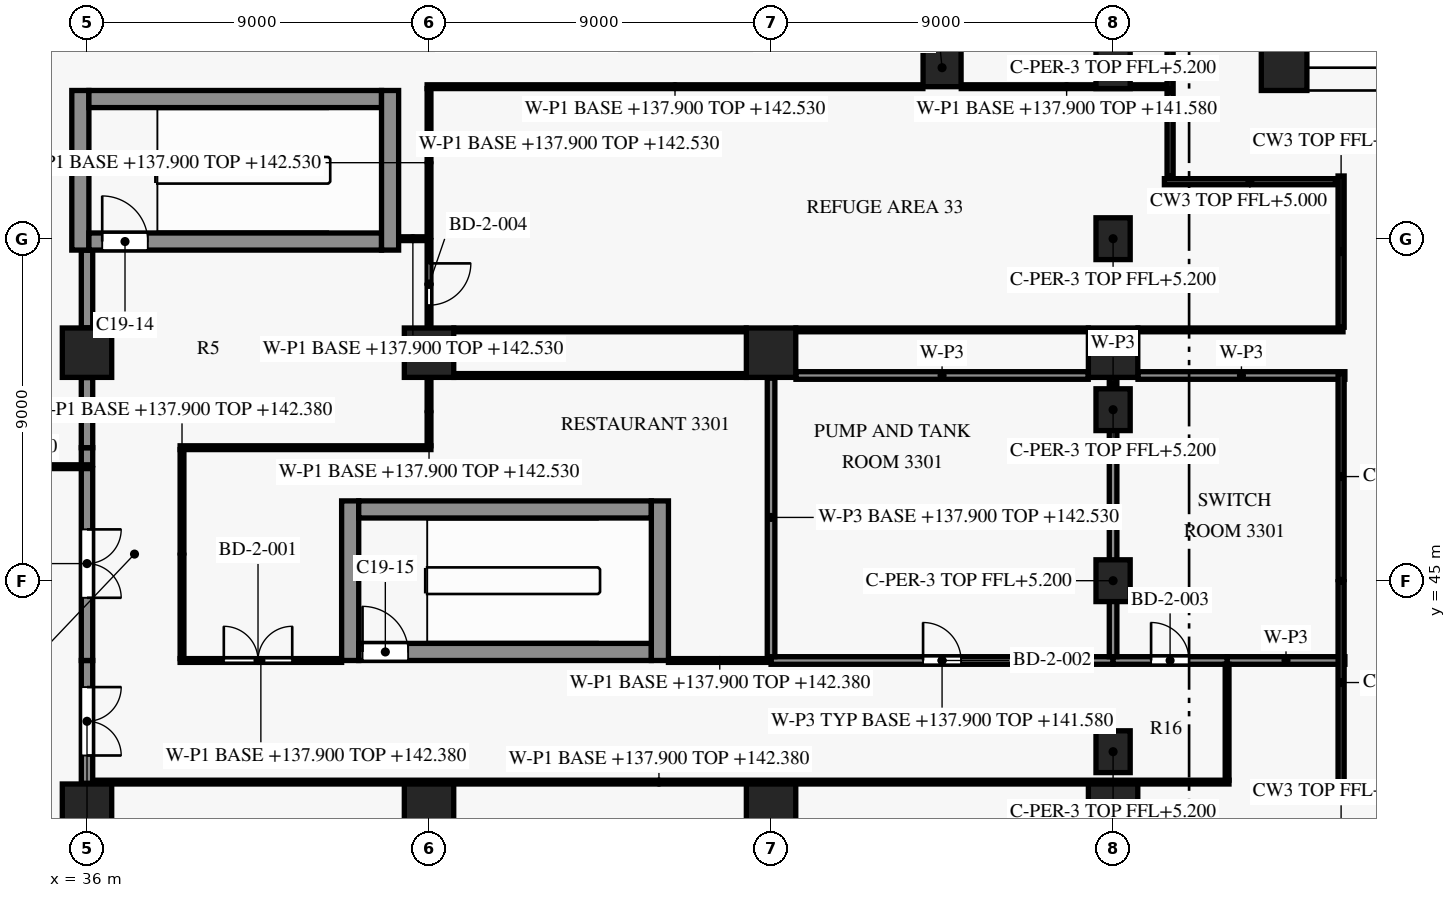
"""IFC4 building model, lengths in metres.
Left out: names, types, materials, properties, quantities, classifications, styles, units other than length and angle.
Written with IfcOpenShell. Run it as: python <this file> out.ifc"""

import sys

from ifc_helpers import new_model, si_unit, direction, frame, frame_2d, origin, origin_2d, place, context, subcontext, project, spatial, rectangle, extrude, element, fill, save


model = new_model("IFC4")
c1 = context("Model", 3, precision=1e-05, world=origin(), true_north=direction((0.0, 1.0)))
c2 = subcontext(c1, "Body", "Model", "MODEL_VIEW")
j1 = project(units=[si_unit("LENGTHUNIT", "METRE"), si_unit("PLANEANGLEUNIT", "RADIAN")], contexts=[c1])
p1 = place(None, origin())
s1 = spatial("IfcSite", under=j1, at=p1, CompositionType="ELEMENT")
p2 = place(p1, origin())
s2 = spatial("IfcBuilding", under=s1, at=p2, CompositionType="ELEMENT")
p3 = place(p2, frame((0.0, 0.0, 137.9)))
s3 = spatial("IfcBuildingStorey", under=s2, at=p3, CompositionType="ELEMENT", Elevation=137.9)
p4 = place(p3, frame((67.5, 58.5, 0.0), z_axis=(0.0, 0.0, 1.0), x_axis=(1.0, 0.0, 0.0)))
e1 = element("IfcColumn", 1, at=p4, inside=s3, PredefinedType="COLUMN", context=c2, shape_type="SweptSolid", body=[
    extrude(rectangle(XDim=1.2, YDim=1.2, at=origin_2d()), origin(), (0.0, 0.0, 1.0), 5.5),
])
for number, where, z_axis, x_axis in (
    (2, (36.0, 39.0, 0.0), (0.0, 0.0, 1.0), (1.0, 0.0, 0.0)),
    (3, (36.0, 51.0, 0.0), (0.0, 0.0, 1.0), (1.0, 0.0, 0.0)),
    (4, (45.0, 39.0, 0.0), (0.0, 0.0, 1.0), (1.0, 0.0, 0.0)),
    (5, (45.0, 51.0, 0.0), (0.0, 0.0, 1.0), (1.0, 0.0, 0.0)),
    (6, (54.0, 39.0, 0.0), (0.0, 0.0, 1.0), (1.0, 0.0, 0.0)),
    (7, (54.0, 51.0, 0.0), (0.0, 0.0, 1.0), (1.0, 0.0, 0.0)),
    (8, (63.0, 39.0, 0.0), (0.0, 0.0, 1.0), (1.0, 0.0, 0.0)),
    (9, (63.0, 51.0, 0.0), (0.0, 0.0, 1.0), (1.0, 0.0, 0.0)),
):
    element("IfcColumn", number, at=place(p3, frame(where, z_axis=z_axis, x_axis=x_axis)), inside=s3, PredefinedType="COLUMN", context=c2, shape_type="SweptSolid", body=[
        extrude(rectangle(XDim=1.3, YDim=1.3, at=origin_2d()), origin(), (0.0, 0.0, 1.0), 5.5),
    ])
p5 = place(p3, frame((43.15, 43.125, 0.0), z_axis=(0.0, 0.0, 1.0), x_axis=(1.0, 0.0, 0.0)))
e10 = element("IfcWall", 10, at=p5, inside=s3, PredefinedType="SHEAR", context=c2, shape_type="SweptSolid", body=[
    extrude(rectangle(XDim=7.7, YDim=0.45, at=frame_2d((3.85, 0.0))), origin(), (0.0, 0.0, 1.0), 5.2),
])
p6 = place(p5, frame((0.1, 0.0, 0.0)))
e11 = element("IfcOpeningElement", 11, at=p6, cuts=e10, PredefinedType="OPENING", context=c2, shape_type="SweptSolid", body=[
    extrude(rectangle(XDim=1.2, YDim=2.2, at=frame_2d((0.6, 1.1))), frame((0.0, 0.235, 0.0), z_axis=(0.0, -1.0, 0.0), x_axis=(1.0, 0.0, 0.0)), (0.0, 0.0, 1.0), 0.47),
])
p7 = place(p3, frame((43.15, 46.875, 0.0), z_axis=(0.0, 0.0, 1.0), x_axis=(1.0, 0.0, 0.0)))
e12 = element("IfcWall", 12, at=p7, inside=s3, PredefinedType="SHEAR", context=c2, shape_type="SweptSolid", body=[
    extrude(rectangle(XDim=7.7, YDim=0.45, at=frame_2d((3.85, 0.0))), origin(), (0.0, 0.0, 1.0), 5.2),
])
p8 = place(p3, frame((36.05, 53.925, 0.0), z_axis=(0.0, 0.0, 1.0), x_axis=(1.0, 0.0, 0.0)))
e13 = element("IfcWall", 13, at=p8, inside=s3, PredefinedType="SHEAR", context=c2, shape_type="SweptSolid", body=[
    extrude(rectangle(XDim=7.7, YDim=0.45, at=frame_2d((3.85, 0.0))), origin(), (0.0, 0.0, 1.0), 5.2),
])
p9 = place(p8, frame((0.35, 0.0, 0.0)))
e14 = element("IfcOpeningElement", 14, at=p9, cuts=e13, PredefinedType="OPENING", context=c2, shape_type="SweptSolid", body=[
    extrude(rectangle(XDim=1.2, YDim=2.2, at=frame_2d((0.6, 1.1))), frame((0.0, 0.235, 0.0), z_axis=(0.0, -1.0, 0.0), x_axis=(1.0, 0.0, 0.0)), (0.0, 0.0, 1.0), 0.47),
])
p10 = place(p3, frame((36.05, 57.675, 0.0), z_axis=(0.0, 0.0, 1.0), x_axis=(1.0, 0.0, 0.0)))
e15 = element("IfcWall", 15, at=p10, inside=s3, PredefinedType="SHEAR", context=c2, shape_type="SweptSolid", body=[
    extrude(rectangle(XDim=7.7, YDim=0.45, at=frame_2d((3.85, 0.0))), origin(), (0.0, 0.0, 1.0), 5.2),
])
p11 = place(p3, frame((35.825, 53.7, 0.0), z_axis=(0.0, 0.0, 1.0), x_axis=(0.0, 1.0, 0.0)))
e16 = element("IfcWall", 16, at=p11, inside=s3, PredefinedType="SHEAR", context=c2, shape_type="SweptSolid", body=[
    extrude(rectangle(XDim=4.2, YDim=0.45, at=frame_2d((2.1, 0.0))), origin(), (0.0, 0.0, 1.0), 5.2),
])
p12 = place(p3, frame((42.925, 42.9, 0.0), z_axis=(0.0, 0.0, 1.0), x_axis=(0.0, 1.0, 0.0)))
e17 = element("IfcWall", 17, at=p12, inside=s3, PredefinedType="SHEAR", context=c2, shape_type="SweptSolid", body=[
    extrude(rectangle(XDim=4.2, YDim=0.45, at=frame_2d((2.1, 0.0))), origin(), (0.0, 0.0, 1.0), 5.2),
])
p13 = place(p3, frame((43.975, 53.7, 0.0), z_axis=(0.0, 0.0, 1.0), x_axis=(0.0, 1.0, 0.0)))
e18 = element("IfcWall", 18, at=p13, inside=s3, PredefinedType="SHEAR", context=c2, shape_type="SweptSolid", body=[
    extrude(rectangle(XDim=4.2, YDim=0.45, at=frame_2d((2.1, 0.0))), origin(), (0.0, 0.0, 1.0), 5.2),
])
p14 = place(p3, frame((51.075, 42.9, 0.0), z_axis=(0.0, 0.0, 1.0), x_axis=(0.0, 1.0, 0.0)))
e19 = element("IfcWall", 19, at=p14, inside=s3, PredefinedType="SHEAR", context=c2, shape_type="SweptSolid", body=[
    extrude(rectangle(XDim=4.2, YDim=0.45, at=frame_2d((2.1, 0.0))), origin(), (0.0, 0.0, 1.0), 5.2),
])
p15 = place(p3, frame((66.05, 39.7, 0.0), z_axis=(0.0, 0.0, 1.0), x_axis=(-1.0, 0.0, 0.0)))
e20 = element("IfcWall", 20, at=p15, inside=s3, PredefinedType="PARTITIONING", context=c2, shape_type="SweptSolid", body=[
    extrude(rectangle(XDim=30.0, YDim=0.1, at=frame_2d((15.0, 0.0))), origin(), (0.0, 0.0, 1.0), 4.48),
])
p16 = place(p3, frame((66.0, 42.8, 0.0), z_axis=(0.0, 0.0, 1.0), x_axis=(0.0, -1.0, 0.0)))
e21 = element("IfcWall", 21, at=p16, inside=s3, PredefinedType="PARTITIONING", context=c2, shape_type="SweptSolid", body=[
    extrude(rectangle(XDim=3.05, YDim=0.1, at=frame_2d((1.525, 0.0))), origin(), (0.0, 0.0, 1.0), 5.18),
])
p17 = place(p3, frame((36.0, 42.9, 0.0), z_axis=(0.0, 0.0, 1.0), x_axis=(0.0, -1.0, 0.0)))
e22 = element("IfcWall", 22, at=p17, inside=s3, PredefinedType="PARTITIONING", context=c2, shape_type="SweptSolid", body=[
    extrude(rectangle(XDim=3.23, YDim=0.3, at=frame_2d((1.615, 0.0))), origin(), (0.0, 0.0, 1.0), 4.48),
])
p18 = place(p17, frame((0.7, 0.0, 0.0)))
e23 = element("IfcOpeningElement", 23, at=p18, cuts=e22, PredefinedType="OPENING", context=c2, shape_type="SweptSolid", body=[
    extrude(rectangle(XDim=1.8, YDim=2.1, at=frame_2d((0.9, 1.05))), frame((0.0, 0.16, 0.0), z_axis=(0.0, -1.0, 0.0), x_axis=(1.0, 0.0, 0.0)), (0.0, 0.0, 1.0), 0.32),
])
p19 = place(p3, frame((38.45, 42.9, 0.0), z_axis=(0.0, 0.0, 1.0), x_axis=(1.0, 0.0, 0.0)))
e24 = element("IfcWall", 24, at=p19, inside=s3, PredefinedType="PARTITIONING", context=c2, shape_type="SweptSolid", body=[
    extrude(rectangle(XDim=4.25, YDim=0.1, at=frame_2d((2.125, 0.0))), origin(), (0.0, 0.0, 1.0), 4.48),
])
p20 = place(p19, frame((1.15, 0.0, 0.0)))
e25 = element("IfcOpeningElement", 25, at=p20, cuts=e24, PredefinedType="OPENING", context=c2, shape_type="SweptSolid", body=[
    extrude(rectangle(XDim=1.8, YDim=2.1, at=frame_2d((0.9, 1.05))), frame((0.0, 0.06, 0.0), z_axis=(0.0, -1.0, 0.0), x_axis=(1.0, 0.0, 0.0)), (0.0, 0.0, 1.0), 0.12),
])
p21 = place(p3, frame((51.3, 42.9, 0.0), z_axis=(0.0, 0.0, 1.0), x_axis=(1.0, 0.0, 0.0)))
e26 = element("IfcWall", 26, at=p21, inside=s3, PredefinedType="PARTITIONING", context=c2, shape_type="SweptSolid", body=[
    extrude(rectangle(XDim=2.7, YDim=0.1, at=frame_2d((1.35, 0.0))), origin(), (0.0, 0.0, 1.0), 4.48),
])
p22 = place(p3, frame((54.0, 42.9, 0.0), z_axis=(0.0, 0.0, 1.0), x_axis=(1.0, 0.0, 0.0)))
e27 = element("IfcWall", 27, at=p22, inside=s3, PredefinedType="PARTITIONING", context=c2, shape_type="SweptSolid", body=[
    extrude(rectangle(XDim=9.0, YDim=0.2, at=frame_2d((4.5, 0.0))), origin(), (0.0, 0.0, 1.0), 3.68),
])
p23 = place(p22, frame((4.0, 0.0, 0.0)))
e28 = element("IfcOpeningElement", 28, at=p23, cuts=e27, PredefinedType="OPENING", context=c2, shape_type="SweptSolid", body=[
    extrude(rectangle(XDim=1.0, YDim=2.1, at=frame_2d((0.5, 1.05))), frame((0.0, 0.11, 0.0), z_axis=(0.0, -1.0, 0.0), x_axis=(1.0, 0.0, 0.0)), (0.0, 0.0, 1.0), 0.22),
])
p24 = place(p3, frame((63.0, 42.9, 0.0), z_axis=(0.0, 0.0, 1.0), x_axis=(1.0, 0.0, 0.0)))
e29 = element("IfcWall", 29, at=p24, inside=s3, PredefinedType="PARTITIONING", context=c2, shape_type="SweptSolid", body=[
    extrude(rectangle(XDim=3.0, YDim=0.2, at=frame_2d((1.5, 0.0))), origin(), (0.0, 0.0, 1.0), 3.68),
])
p25 = place(p24, frame((1.0, 0.0, 0.0)))
e30 = element("IfcOpeningElement", 30, at=p25, cuts=e29, PredefinedType="OPENING", context=c2, shape_type="SweptSolid", body=[
    extrude(rectangle(XDim=1.0, YDim=2.1, at=frame_2d((0.5, 1.05))), frame((0.0, 0.11, 0.0), z_axis=(0.0, -1.0, 0.0), x_axis=(1.0, 0.0, 0.0)), (0.0, 0.0, 1.0), 0.22),
])
p26 = place(p3, frame((69.1, 42.9, 0.0), z_axis=(0.0, 0.0, 1.0), x_axis=(-1.0, 0.0, 0.0)))
e31 = element("IfcWall", 31, at=p26, inside=s3, PredefinedType="PARTITIONING", context=c2, shape_type="SweptSolid", body=[
    extrude(rectangle(XDim=3.1, YDim=0.2, at=frame_2d((1.55, 0.0))), origin(), (0.0, 0.0, 1.0), 5.18),
])
p27 = place(p3, frame((63.0, 44.545, 0.0), z_axis=(0.0, 0.0, 1.0), x_axis=(0.0, -1.0, 0.0)))
e32 = element("IfcWall", 32, at=p27, inside=s3, PredefinedType="PARTITIONING", context=c2, shape_type="SweptSolid", body=[
    extrude(rectangle(XDim=1.545, YDim=0.2, at=frame_2d((0.772, 0.0))), origin(), (0.0, 0.0, 1.0), 3.68),
])
p28 = place(p3, frame((36.0, 47.95, 0.0), z_axis=(0.0, 0.0, 1.0), x_axis=(0.0, -1.0, 0.0)))
e33 = element("IfcWall", 33, at=p28, inside=s3, PredefinedType="PARTITIONING", context=c2, shape_type="SweptSolid", body=[
    extrude(rectangle(XDim=5.05, YDim=0.3, at=frame_2d((2.525, 0.0))), origin(), (0.0, 0.0, 1.0), 4.48),
])
p29 = place(p28, frame((1.6, 0.0, 0.0)))
e34 = element("IfcOpeningElement", 34, at=p29, cuts=e33, PredefinedType="OPENING", context=c2, shape_type="SweptSolid", body=[
    extrude(rectangle(XDim=1.8, YDim=2.1, at=frame_2d((0.9, 1.05))), frame((0.0, 0.16, 0.0), z_axis=(0.0, -1.0, 0.0), x_axis=(1.0, 0.0, 0.0)), (0.0, 0.0, 1.0), 0.32),
])
p30 = place(p3, frame((27.15, 48.0, 0.0), z_axis=(0.0, 0.0, 1.0), x_axis=(1.0, 0.0, 0.0)))
e35 = element("IfcWall", 35, at=p30, inside=s3, PredefinedType="PARTITIONING", context=c2, shape_type="SweptSolid", body=[
    extrude(rectangle(XDim=8.8, YDim=0.1, at=frame_2d((4.4, 0.0))), origin(), (0.0, 0.0, 1.0), 4.48),
])
p31 = place(p3, frame((36.0, 48.05, 0.0), z_axis=(0.0, 0.0, 1.0), x_axis=(0.0, 1.0, 0.0)))
e36 = element("IfcWall", 36, at=p31, inside=s3, PredefinedType="PARTITIONING", context=c2, shape_type="SweptSolid", body=[
    extrude(rectangle(XDim=0.45, YDim=0.3, at=frame_2d((0.225, 0.0))), origin(), (0.0, 0.0, 1.0), 4.48),
])
p32 = place(p3, frame((38.5, 48.45, 0.0), z_axis=(0.0, 0.0, 1.0), x_axis=(0.0, -1.0, 0.0)))
e37 = element("IfcWall", 37, at=p32, inside=s3, PredefinedType="PARTITIONING", context=c2, shape_type="SweptSolid", body=[
    extrude(rectangle(XDim=5.5, YDim=0.1, at=frame_2d((2.75, 0.0))), origin(), (0.0, 0.0, 1.0), 4.48),
])
p33 = place(p3, frame((36.0, 48.5, 0.0), z_axis=(0.0, 0.0, 1.0), x_axis=(0.0, 1.0, 0.0)))
e38 = element("IfcWall", 38, at=p33, inside=s3, PredefinedType="PARTITIONING", context=c2, shape_type="SweptSolid", body=[
    extrude(rectangle(XDim=1.845, YDim=0.3, at=frame_2d((0.922, 0.0))), origin(), (0.0, 0.0, 1.0), 4.48),
])
p34 = place(p3, frame((45.05, 48.5, 0.0), z_axis=(0.0, 0.0, 1.0), x_axis=(-1.0, 0.0, 0.0)))
e39 = element("IfcWall", 39, at=p34, inside=s3, PredefinedType="PARTITIONING", context=c2, shape_type="SweptSolid", body=[
    extrude(rectangle(XDim=6.6, YDim=0.1, at=frame_2d((3.3, 0.0))), origin(), (0.0, 0.0, 1.0), 4.63),
])
p35 = place(p3, frame((63.0, 49.045, 0.0), z_axis=(0.0, 0.0, 1.0), x_axis=(0.0, -1.0, 0.0)))
e40 = element("IfcWall", 40, at=p35, inside=s3, PredefinedType="PARTITIONING", context=c2, shape_type="SweptSolid", body=[
    extrude(rectangle(XDim=3.59, YDim=0.2, at=frame_2d((1.795, 0.0))), origin(), (0.0, 0.0, 1.0), 3.68),
])
p36 = place(p3, frame((54.0, 50.33, 0.0), z_axis=(0.0, 0.0, 1.0), x_axis=(0.0, -1.0, 0.0)))
e41 = element("IfcWall", 41, at=p36, inside=s3, PredefinedType="PARTITIONING", context=c2, shape_type="SweptSolid", body=[
    extrude(rectangle(XDim=7.33, YDim=0.2, at=frame_2d((3.665, 0.0))), origin(), (0.0, 0.0, 1.0), 4.63),
])
p37 = place(p3, frame((63.0, 50.33, 0.0), z_axis=(0.0, 0.0, 1.0), x_axis=(0.0, -1.0, 0.0)))
e42 = element("IfcWall", 42, at=p37, inside=s3, PredefinedType="PARTITIONING", context=c2, shape_type="SweptSolid", body=[
    extrude(rectangle(XDim=0.375, YDim=0.2, at=frame_2d((0.188, 0.0))), origin(), (0.0, 0.0, 1.0), 5.18),
])
p38 = place(p3, frame((45.0, 50.345, 0.0), z_axis=(0.0, 0.0, 1.0), x_axis=(0.0, -1.0, 0.0)))
e43 = element("IfcWall", 43, at=p38, inside=s3, PredefinedType="PARTITIONING", context=c2, shape_type="SweptSolid", body=[
    extrude(rectangle(XDim=1.795, YDim=0.1, at=frame_2d((0.897, 0.0))), origin(), (0.0, 0.0, 1.0), 4.63),
])
p39 = place(p3, frame((45.655, 50.4, 0.0), z_axis=(0.0, 0.0, 1.0), x_axis=(1.0, 0.0, 0.0)))
e44 = element("IfcWall", 44, at=p39, inside=s3, PredefinedType="PARTITIONING", context=c2, shape_type="SweptSolid", body=[
    extrude(rectangle(XDim=7.69, YDim=0.1, at=frame_2d((3.845, 0.0))), origin(), (0.0, 0.0, 1.0), 5.18),
])
p40 = place(p3, frame((54.655, 50.4, 0.0), z_axis=(0.0, 0.0, 1.0), x_axis=(1.0, 0.0, 0.0)))
e45 = element("IfcWall", 45, at=p40, inside=s3, PredefinedType="PARTITIONING", context=c2, shape_type="SweptSolid", body=[
    extrude(rectangle(XDim=7.69, YDim=0.2, at=frame_2d((3.845, 0.0))), origin(), (0.0, 0.0, 1.0), 5.18),
])
p41 = place(p3, frame((63.655, 50.4, 0.0), z_axis=(0.0, 0.0, 1.0), x_axis=(1.0, 0.0, 0.0)))
e46 = element("IfcWall", 46, at=p41, inside=s3, PredefinedType="PARTITIONING", context=c2, shape_type="SweptSolid", body=[
    extrude(rectangle(XDim=5.445, YDim=0.2, at=frame_2d((2.723, 0.0))), origin(), (0.0, 0.0, 1.0), 5.18),
])
for number, where, z_axis, x_axis in (
    (47, (53.345, 51.6, 0.0), (0.0, 0.0, 1.0), (-1.0, 0.0, 0.0)),
    (48, (62.345, 51.6, 0.0), (0.0, 0.0, 1.0), (-1.0, 0.0, 0.0)),
):
    element("IfcWall", number, at=place(p3, frame(where, z_axis=z_axis, x_axis=x_axis)), inside=s3, PredefinedType="PARTITIONING", context=c2, shape_type="SweptSolid", body=[
        extrude(rectangle(XDim=7.69, YDim=0.1, at=frame_2d((3.845, 0.0))), origin(), (0.0, 0.0, 1.0), 5.18),
    ])
p42 = place(p3, frame((69.05, 51.6, 0.0), z_axis=(0.0, 0.0, 1.0), x_axis=(-1.0, 0.0, 0.0)))
e49 = element("IfcWall", 49, at=p42, inside=s3, PredefinedType="PARTITIONING", context=c2, shape_type="SweptSolid", body=[
    extrude(rectangle(XDim=5.395, YDim=0.1, at=frame_2d((2.698, 0.0))), origin(), (0.0, 0.0, 1.0), 5.18),
])
p43 = place(p3, frame((36.0, 51.655, 0.0), z_axis=(0.0, 0.0, 1.0), x_axis=(0.0, 1.0, 0.0)))
e50 = element("IfcWall", 50, at=p43, inside=s3, PredefinedType="PARTITIONING", context=c2, shape_type="SweptSolid", body=[
    extrude(rectangle(XDim=2.045, YDim=0.3, at=frame_2d((1.022, 0.0))), origin(), (0.0, 0.0, 1.0), 4.48),
])
p44 = place(p3, frame((45.0, 53.95, 0.0), z_axis=(0.0, 0.0, 1.0), x_axis=(0.0, -1.0, 0.0)))
e51 = element("IfcWall", 51, at=p44, inside=s3, PredefinedType="PARTITIONING", context=c2, shape_type="SweptSolid", body=[
    extrude(rectangle(XDim=2.295, YDim=0.1, at=frame_2d((1.147, 0.0))), origin(), (0.0, 0.0, 1.0), 4.63),
])
p45 = place(p44, frame((0.6, 0.0, 0.0)))
e52 = element("IfcOpeningElement", 52, at=p45, cuts=e51, PredefinedType="OPENING", context=c2, shape_type="SweptSolid", body=[
    extrude(rectangle(XDim=1.1, YDim=2.1, at=frame_2d((0.55, 1.05))), frame((0.0, 0.06, 0.0), z_axis=(0.0, -1.0, 0.0), x_axis=(1.0, 0.0, 0.0)), (0.0, 0.0, 1.0), 0.12),
])
p46 = place(p3, frame((44.2, 54.0, 0.0), z_axis=(0.0, 0.0, 1.0), x_axis=(1.0, 0.0, 0.0)))
e53 = element("IfcWall", 53, at=p46, inside=s3, PredefinedType="PARTITIONING", context=c2, shape_type="SweptSolid", body=[
    extrude(rectangle(XDim=0.75, YDim=0.1, at=frame_2d((0.375, 0.0))), origin(), (0.0, 0.0, 1.0), 4.63),
])
p47 = place(p3, frame((45.0, 54.05, 0.0), z_axis=(0.0, 0.0, 1.0), x_axis=(0.0, 1.0, 0.0)))
e54 = element("IfcWall", 54, at=p47, inside=s3, PredefinedType="PARTITIONING", context=c2, shape_type="SweptSolid", body=[
    extrude(rectangle(XDim=3.9, YDim=0.1, at=frame_2d((1.95, 0.0))), origin(), (0.0, 0.0, 1.0), 4.63),
])
p48 = place(p3, frame((44.95, 58.0, 0.0), z_axis=(0.0, 0.0, 1.0), x_axis=(1.0, 0.0, 0.0)))
e55 = element("IfcWall", 55, at=p48, inside=s3, PredefinedType="PARTITIONING", context=c2, shape_type="SweptSolid", body=[
    extrude(rectangle(XDim=13.045, YDim=0.1, at=frame_2d((6.522, 0.0))), origin(), (0.0, 0.0, 1.0), 4.63),
])
p49 = place(p3, frame((59.005, 58.0, 0.0), z_axis=(0.0, 0.0, 1.0), x_axis=(1.0, 0.0, 0.0)))
e56 = element("IfcWall", 56, at=p49, inside=s3, PredefinedType="PARTITIONING", context=c2, shape_type="SweptSolid", body=[
    extrude(rectangle(XDim=5.545, YDim=0.1, at=frame_2d((2.772, 0.0))), origin(), (0.0, 0.0, 1.0), 3.68),
])
p50 = place(p3, frame((58.5, 58.5, 0.0), z_axis=(0.0, 0.0, 1.0), x_axis=(1.0, 0.0, 0.0)))
e57 = element("IfcColumn", 57, at=p50, inside=s3, PredefinedType="COLUMN", context=c2, shape_type="SweptSolid", body=[
    extrude(rectangle(XDim=1.0, YDim=1.0, at=origin_2d()), origin(), (0.0, 0.0, 1.0), 5.2),
])
for number, where, z_axis, x_axis in (
    (58, (63.0, 40.5, 0.0), (0.0, 0.0, 1.0), (0.0, 1.0, 0.0)),
    (59, (63.0, 45.0, 0.0), (0.0, 0.0, 1.0), (0.0, 1.0, 0.0)),
    (60, (63.0, 49.5, 0.0), (0.0, 0.0, 1.0), (0.0, 1.0, 0.0)),
    (61, (63.0, 54.0, 0.0), (0.0, 0.0, 1.0), (0.0, 1.0, 0.0)),
    (62, (63.0, 58.5, 0.0), (0.0, 0.0, 1.0), (0.0, 1.0, 0.0)),
):
    element("IfcColumn", number, at=place(p3, frame(where, z_axis=z_axis, x_axis=x_axis)), inside=s3, PredefinedType="COLUMN", context=c2, shape_type="SweptSolid", body=[
        extrude(rectangle(XDim=0.9, YDim=1.1, at=origin_2d()), origin(), (0.0, 0.0, 1.0), 5.2),
    ])
p51 = place(p9, origin())
e63 = element("IfcDoor", 63, at=p51, inside=s3, OperationType="SINGLE_SWING_LEFT", PredefinedType="DOOR", context=c2, shape_type="SweptSolid", body=[
    extrude(rectangle(XDim=1.2, YDim=2.2, at=frame_2d((0.6, 1.1))), frame((0.0, 0.025, 0.0), z_axis=(0.0, -1.0, 0.0), x_axis=(1.0, 0.0, 0.0)), (0.0, 0.0, 1.0), 0.05),
])
fill(e14, e63)
p52 = place(p6, origin())
e64 = element("IfcDoor", 64, at=p52, inside=s3, OperationType="SINGLE_SWING_RIGHT", PredefinedType="DOOR", context=c2, shape_type="SweptSolid", body=[
    extrude(rectangle(XDim=1.2, YDim=2.2, at=frame_2d((0.6, 1.1))), frame((0.0, 0.025, 0.0), z_axis=(0.0, -1.0, 0.0), x_axis=(1.0, 0.0, 0.0)), (0.0, 0.0, 1.0), 0.05),
])
fill(e11, e64)
p53 = place(p20, origin())
e65 = element("IfcDoor", 65, at=p53, inside=s3, OperationType="DOUBLE_DOOR_SINGLE_SWING", PredefinedType="DOOR", context=c2, shape_type="SweptSolid", body=[
    extrude(rectangle(XDim=1.8, YDim=2.1, at=frame_2d((0.9, 1.05))), frame((0.0, 0.025, 0.0), z_axis=(0.0, -1.0, 0.0), x_axis=(1.0, 0.0, 0.0)), (0.0, 0.0, 1.0), 0.05),
])
fill(e25, e65)
p54 = place(p23, origin())
e66 = element("IfcDoor", 66, at=p54, inside=s3, OperationType="SINGLE_SWING_LEFT", PredefinedType="DOOR", context=c2, shape_type="SweptSolid", body=[
    extrude(rectangle(XDim=1.0, YDim=2.1, at=frame_2d((0.5, 1.05))), frame((0.0, 0.025, 0.0), z_axis=(0.0, -1.0, 0.0), x_axis=(1.0, 0.0, 0.0)), (0.0, 0.0, 1.0), 0.05),
])
fill(e28, e66)
p55 = place(p25, origin())
e67 = element("IfcDoor", 67, at=p55, inside=s3, OperationType="SINGLE_SWING_LEFT", PredefinedType="DOOR", context=c2, shape_type="SweptSolid", body=[
    extrude(rectangle(XDim=1.0, YDim=2.1, at=frame_2d((0.5, 1.05))), frame((0.0, 0.025, 0.0), z_axis=(0.0, -1.0, 0.0), x_axis=(1.0, 0.0, 0.0)), (0.0, 0.0, 1.0), 0.05),
])
fill(e30, e67)
p56 = place(p45, origin())
e68 = element("IfcDoor", 68, at=p56, inside=s3, OperationType="SINGLE_SWING_LEFT", PredefinedType="DOOR", context=c2, shape_type="SweptSolid", body=[
    extrude(rectangle(XDim=1.1, YDim=2.1, at=frame_2d((0.55, 1.05))), frame((0.0, 0.025, 0.0), z_axis=(0.0, -1.0, 0.0), x_axis=(1.0, 0.0, 0.0)), (0.0, 0.0, 1.0), 0.05),
])
fill(e52, e68)
p57 = place(p18, origin())
e69 = element("IfcDoor", 69, at=p57, inside=s3, OperationType="DOUBLE_DOOR_SINGLE_SWING", PredefinedType="DOOR", context=c2, shape_type="SweptSolid", body=[
    extrude(rectangle(XDim=1.8, YDim=2.1, at=frame_2d((0.9, 1.05))), frame((0.0, 0.025, 0.0), z_axis=(0.0, -1.0, 0.0), x_axis=(1.0, 0.0, 0.0)), (0.0, 0.0, 1.0), 0.05),
])
fill(e23, e69)
p58 = place(p29, origin())
e70 = element("IfcDoor", 70, at=p58, inside=s3, OperationType="DOUBLE_DOOR_SINGLE_SWING", PredefinedType="DOOR", context=c2, shape_type="SweptSolid", body=[
    extrude(rectangle(XDim=1.8, YDim=2.1, at=frame_2d((0.9, 1.05))), frame((0.0, 0.025, 0.0), z_axis=(0.0, -1.0, 0.0), x_axis=(1.0, 0.0, 0.0)), (0.0, 0.0, 1.0), 0.05),
])
fill(e34, e70)
save(model, sys.argv[1])
